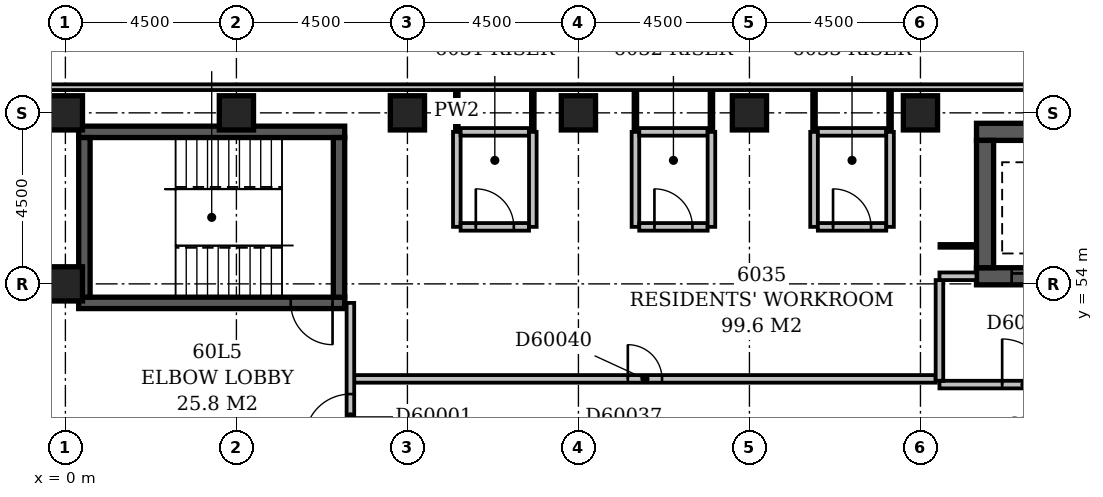
"""IFC4 building model, lengths in metres.
Left out: names, types, materials, properties, quantities, classifications, styles, units other than length and angle.
Written with IfcOpenShell. Run it as: python <this file> out.ifc"""

import sys

from ifc_helpers import new_model, si_unit, direction, frame, frame_2d, origin, origin_2d, place, context, subcontext, project, spatial, rectangle, extrude, element, fill, save


model = new_model("IFC4")
c1 = context("Model", 3, precision=1e-05, world=origin(), true_north=direction((0.0, 1.0)))
c2 = subcontext(c1, "Body", "Model", "MODEL_VIEW")
j1 = project(units=[si_unit("LENGTHUNIT", "METRE"), si_unit("PLANEANGLEUNIT", "RADIAN")], contexts=[c1])
p1 = place(None, origin())
s1 = spatial("IfcSite", under=j1, at=p1, CompositionType="ELEMENT")
p2 = place(p1, origin())
s2 = spatial("IfcBuilding", under=s1, at=p2, CompositionType="ELEMENT")
p3 = place(p2, frame((0.0, 0.0, 233.0)))
s3 = spatial("IfcBuildingStorey", under=s2, at=p3, CompositionType="ELEMENT", Elevation=233.0)
p4 = place(p3, frame((0.35, 53.5, -0.35), z_axis=(0.0, 0.0, 1.0), x_axis=(1.0, 0.0, 0.0)))
e1 = element("IfcWall", 1, at=p4, inside=s3, PredefinedType="SHEAR", context=c2, shape_type="SweptSolid", body=[
    extrude(rectangle(XDim=7.0, YDim=0.3, at=frame_2d((3.5, 0.0))), origin(), (0.0, 0.0, 1.0), 3.65),
])
p5 = place(p4, frame((5.58, 0.0, 0.35)))
e2 = element("IfcOpeningElement", 2, at=p5, cuts=e1, PredefinedType="OPENING", context=c2, shape_type="SweptSolid", body=[
    extrude(rectangle(XDim=1.1, YDim=2.1, at=frame_2d((0.55, 1.05))), frame((0.0, 0.162, 0.0), z_axis=(0.0, -1.0, 0.0), x_axis=(1.0, 0.0, 0.0)), (0.0, 0.0, 1.0), 0.324),
])
p6 = place(p3, frame((0.35, 58.0, -0.35), z_axis=(0.0, 0.0, 1.0), x_axis=(1.0, 0.0, 0.0)))
e3 = element("IfcWall", 3, at=p6, inside=s3, PredefinedType="SHEAR", context=c2, shape_type="SweptSolid", body=[
    extrude(rectangle(XDim=7.0, YDim=0.3, at=frame_2d((3.5, 0.0))), origin(), (0.0, 0.0, 1.0), 3.65),
])
for number, where, z_axis, x_axis in (
    (4, (0.5, 53.65, -0.35), (0.0, 0.0, 1.0), (0.0, 1.0, 0.0)),
    (5, (7.2, 53.65, -0.35), (0.0, 0.0, 1.0), (0.0, 1.0, 0.0)),
):
    element("IfcWall", number, at=place(p3, frame(where, z_axis=z_axis, x_axis=x_axis)), inside=s3, PredefinedType="SHEAR", context=c2, shape_type="SweptSolid", body=[
        extrude(rectangle(XDim=4.2, YDim=0.3, at=frame_2d((2.1, 0.0))), origin(), (0.0, 0.0, 1.0), 3.65),
    ])
p7 = place(p3, frame((23.975, 54.2, -0.35), z_axis=(0.0, 0.0, 1.0), x_axis=(1.0, 0.0, 0.0)))
e6 = element("IfcWall", 6, at=p7, inside=s3, PredefinedType="SHEAR", context=c2, shape_type="SweptSolid", body=[
    extrude(rectangle(XDim=2.95, YDim=0.45, at=frame_2d((1.475, 0.0))), origin(), (0.0, 0.0, 1.0), 3.65),
])
p8 = place(p7, frame((0.925, 0.0, 0.35)))
e7 = element("IfcOpeningElement", 7, at=p8, cuts=e6, PredefinedType="OPENING", context=c2, shape_type="SweptSolid", body=[
    extrude(rectangle(XDim=1.1, YDim=2.1, at=frame_2d((0.55, 1.05))), frame((0.0, 0.237, 0.0), z_axis=(0.0, -1.0, 0.0), x_axis=(1.0, 0.0, 0.0)), (0.0, 0.0, 1.0), 0.474),
])
p9 = place(p3, frame((23.975, 58.0, -0.35), z_axis=(0.0, 0.0, 1.0), x_axis=(1.0, 0.0, 0.0)))
e8 = element("IfcWall", 8, at=p9, inside=s3, PredefinedType="SHEAR", context=c2, shape_type="SweptSolid", body=[
    extrude(rectangle(XDim=2.95, YDim=0.45, at=frame_2d((1.475, 0.0))), origin(), (0.0, 0.0, 1.0), 3.65),
])
p10 = place(p3, frame((24.2, 54.425, -0.35), z_axis=(0.0, 0.0, 1.0), x_axis=(0.0, 1.0, 0.0)))
e9 = element("IfcWall", 9, at=p10, inside=s3, PredefinedType="SHEAR", context=c2, shape_type="SweptSolid", body=[
    extrude(rectangle(XDim=3.35, YDim=0.45, at=frame_2d((1.675, 0.0))), origin(), (0.0, 0.0, 1.0), 3.65),
])
for number, where, z_axis, x_axis in (
    (10, (0.0, 54.0, -0.35), (0.0, 0.0, 1.0), (1.0, 0.0, 0.0)),
    (11, (0.0, 58.5, -0.35), (0.0, 0.0, 1.0), (1.0, 0.0, 0.0)),
    (12, (4.5, 58.5, -0.35), (0.0, 0.0, 1.0), (1.0, 0.0, 0.0)),
    (13, (9.0, 58.5, -0.35), (0.0, 0.0, 1.0), (1.0, 0.0, 0.0)),
    (14, (13.5, 58.5, -0.35), (0.0, 0.0, 1.0), (1.0, 0.0, 0.0)),
    (15, (18.0, 58.5, -0.35), (0.0, 0.0, 1.0), (1.0, 0.0, 0.0)),
    (16, (22.5, 58.5, -0.35), (0.0, 0.0, 1.0), (1.0, 0.0, 0.0)),
):
    element("IfcColumn", number, at=place(p3, frame(where, z_axis=z_axis, x_axis=x_axis)), inside=s3, PredefinedType="COLUMN", context=c2, shape_type="SweptSolid", body=[
        extrude(rectangle(XDim=0.9, YDim=0.9, at=origin_2d()), origin(), (0.0, 0.0, 1.0), 3.65),
    ])
p11 = place(p3, frame((45.6, 59.175, 0.0), z_axis=(0.0, 0.0, 1.0), x_axis=(-1.0, 0.0, 0.0)))
e17 = element("IfcWall", 17, at=p11, inside=s3, PredefinedType="STANDARD", context=c2, shape_type="SweptSolid", body=[
    extrude(rectangle(XDim=46.35, YDim=0.15, at=frame_2d((23.175, 0.0))), origin(), (0.0, 0.0, 1.0), 2.7),
])
p12 = place(p11, frame((15.15, 0.0, 0.6)))
e18 = element("IfcOpeningElement", 18, at=p12, cuts=e17, PredefinedType="OPENING", context=c2, shape_type="SweptSolid", body=[
    extrude(rectangle(XDim=2.4, YDim=1.8, at=frame_2d((1.2, 0.9))), frame((0.0, 0.087, 0.0), z_axis=(0.0, -1.0, 0.0), x_axis=(1.0, 0.0, 0.0)), (0.0, 0.0, 1.0), 0.174),
])
p13 = place(p3, frame((23.0, 51.35, 0.0), z_axis=(0.0, 0.0, 1.0), x_axis=(1.0, 0.0, 0.0)))
e19 = element("IfcWall", 19, at=p13, inside=s3, PredefinedType="PARTITIONING", context=c2, shape_type="SweptSolid", body=[
    extrude(rectangle(XDim=4.8, YDim=0.2, at=frame_2d((2.4, 0.0))), origin(), (0.0, 0.0, 1.0), 3.3),
])
p14 = place(p13, frame((1.65, 0.0, 0.0)))
e20 = element("IfcOpeningElement", 20, at=p14, cuts=e19, PredefinedType="OPENING", context=c2, shape_type="SweptSolid", body=[
    extrude(rectangle(XDim=1.2, YDim=2.1, at=frame_2d((0.6, 1.05))), frame((0.0, 0.112, 0.0), z_axis=(0.0, -1.0, 0.0), x_axis=(1.0, 0.0, 0.0)), (0.0, 0.0, 1.0), 0.224),
])
p15 = place(p3, frame((23.0, 54.2, 0.0), z_axis=(0.0, 0.0, 1.0), x_axis=(1.0, 0.0, 0.0)))
e21 = element("IfcWall", 21, at=p15, inside=s3, PredefinedType="PARTITIONING", context=c2, shape_type="SweptSolid", body=[
    extrude(rectangle(XDim=0.975, YDim=0.2, at=frame_2d((0.488, 0.0))), origin(), (0.0, 0.0, 1.0), 3.3),
])
p16 = place(p3, frame((23.0, 51.45, 0.0), z_axis=(0.0, 0.0, 1.0), x_axis=(0.0, 1.0, 0.0)))
e22 = element("IfcWall", 22, at=p16, inside=s3, PredefinedType="PARTITIONING", context=c2, shape_type="SweptSolid", body=[
    extrude(rectangle(XDim=2.65, YDim=0.2, at=frame_2d((1.325, 0.0))), origin(), (0.0, 0.0, 1.0), 3.3),
])
p17 = place(p3, frame((7.5, 49.6, 0.0), z_axis=(0.0, 0.0, 1.0), x_axis=(0.0, 1.0, 0.0)))
e23 = element("IfcWall", 23, at=p17, inside=s3, PredefinedType="PARTITIONING", context=c2, shape_type="SweptSolid", body=[
    extrude(rectangle(XDim=3.9, YDim=0.2, at=frame_2d((1.95, 0.0))), origin(), (0.0, 0.0, 1.0), 3.3),
])
p18 = place(p17, frame((0.3, 0.0, 0.0)))
e24 = element("IfcOpeningElement", 24, at=p18, cuts=e23, PredefinedType="OPENING", context=c2, shape_type="SweptSolid", body=[
    extrude(rectangle(XDim=1.2, YDim=2.1, at=frame_2d((0.6, 1.05))), frame((0.0, 0.112, 0.0), z_axis=(0.0, -1.0, 0.0), x_axis=(1.0, 0.0, 0.0)), (0.0, 0.0, 1.0), 0.224),
])
p19 = place(p3, frame((7.6, 51.5, 0.0), z_axis=(0.0, 0.0, 1.0), x_axis=(1.0, 0.0, 0.0)))
e25 = element("IfcWall", 25, at=p19, inside=s3, PredefinedType="PARTITIONING", context=c2, shape_type="SweptSolid", body=[
    extrude(rectangle(XDim=15.3, YDim=0.2, at=frame_2d((7.65, 0.0))), origin(), (0.0, 0.0, 1.0), 3.3),
])
p20 = place(p19, frame((7.2, 0.0, 0.0)))
e26 = element("IfcOpeningElement", 26, at=p20, cuts=e25, PredefinedType="OPENING", context=c2, shape_type="SweptSolid", body=[
    extrude(rectangle(XDim=0.9, YDim=2.1, at=frame_2d((0.45, 1.05))), frame((0.0, 0.112, 0.0), z_axis=(0.0, -1.0, 0.0), x_axis=(1.0, 0.0, 0.0)), (0.0, 0.0, 1.0), 0.224),
])
p21 = place(p3, frame((23.0, 55.0, 0.0), z_axis=(0.0, 0.0, 1.0), x_axis=(1.0, 0.0, 0.0)))
e27 = element("IfcWall", 27, at=p21, inside=s3, PredefinedType="PARTITIONING", context=c2, shape_type="SweptSolid", body=[
    extrude(rectangle(XDim=0.975, YDim=0.1, at=frame_2d((0.488, 0.0))), origin(), (0.0, 0.0, 1.0), 3.3),
])
p22 = place(p3, frame((10.3, 55.5, 0.0), z_axis=(0.0, 0.0, 1.0), x_axis=(0.0, 1.0, 0.0)))
e28 = element("IfcWall", 28, at=p22, inside=s3, PredefinedType="PARTITIONING", context=c2, shape_type="SweptSolid", body=[
    extrude(rectangle(XDim=2.5, YDim=0.2, at=frame_2d((1.25, 0.0))), origin(), (0.0, 0.0, 1.0), 3.3),
])
p23 = place(p3, frame((10.4, 55.5, 0.0), z_axis=(0.0, 0.0, 1.0), x_axis=(1.0, 0.0, 0.0)))
e29 = element("IfcWall", 29, at=p23, inside=s3, PredefinedType="PARTITIONING", context=c2, shape_type="SweptSolid", body=[
    extrude(rectangle(XDim=1.8, YDim=0.2, at=frame_2d((0.9, 0.0))), origin(), (0.0, 0.0, 1.0), 3.3),
])
p24 = place(p23, frame((0.4, 0.0, 0.0)))
e30 = element("IfcOpeningElement", 30, at=p24, cuts=e29, PredefinedType="OPENING", context=c2, shape_type="SweptSolid", body=[
    extrude(rectangle(XDim=1.0, YDim=2.1, at=frame_2d((0.5, 1.05))), frame((0.0, 0.112, 0.0), z_axis=(0.0, -1.0, 0.0), x_axis=(1.0, 0.0, 0.0)), (0.0, 0.0, 1.0), 0.224),
])
for number, where, z_axis, x_axis in (
    (31, (12.3, 55.5, 0.0), (0.0, 0.0, 1.0), (0.0, 1.0, 0.0)),
    (32, (15.0, 55.5, 0.0), (0.0, 0.0, 1.0), (0.0, 1.0, 0.0)),
):
    element("IfcWall", number, at=place(p3, frame(where, z_axis=z_axis, x_axis=x_axis)), inside=s3, PredefinedType="PARTITIONING", context=c2, shape_type="SweptSolid", body=[
        extrude(rectangle(XDim=2.5, YDim=0.2, at=frame_2d((1.25, 0.0))), origin(), (0.0, 0.0, 1.0), 3.3),
    ])
p25 = place(p3, frame((15.1, 55.5, 0.0), z_axis=(0.0, 0.0, 1.0), x_axis=(1.0, 0.0, 0.0)))
e33 = element("IfcWall", 33, at=p25, inside=s3, PredefinedType="PARTITIONING", context=c2, shape_type="SweptSolid", body=[
    extrude(rectangle(XDim=1.8, YDim=0.2, at=frame_2d((0.9, 0.0))), origin(), (0.0, 0.0, 1.0), 3.3),
])
p26 = place(p25, frame((0.4, 0.0, 0.0)))
e34 = element("IfcOpeningElement", 34, at=p26, cuts=e33, PredefinedType="OPENING", context=c2, shape_type="SweptSolid", body=[
    extrude(rectangle(XDim=1.0, YDim=2.1, at=frame_2d((0.5, 1.05))), frame((0.0, 0.112, 0.0), z_axis=(0.0, -1.0, 0.0), x_axis=(1.0, 0.0, 0.0)), (0.0, 0.0, 1.0), 0.224),
])
for number, where, z_axis, x_axis in (
    (35, (17.0, 55.5, 0.0), (0.0, 0.0, 1.0), (0.0, 1.0, 0.0)),
    (36, (19.7, 55.5, 0.0), (0.0, 0.0, 1.0), (0.0, 1.0, 0.0)),
):
    element("IfcWall", number, at=place(p3, frame(where, z_axis=z_axis, x_axis=x_axis)), inside=s3, PredefinedType="PARTITIONING", context=c2, shape_type="SweptSolid", body=[
        extrude(rectangle(XDim=2.5, YDim=0.2, at=frame_2d((1.25, 0.0))), origin(), (0.0, 0.0, 1.0), 3.3),
    ])
p27 = place(p3, frame((19.8, 55.5, 0.0), z_axis=(0.0, 0.0, 1.0), x_axis=(1.0, 0.0, 0.0)))
e37 = element("IfcWall", 37, at=p27, inside=s3, PredefinedType="PARTITIONING", context=c2, shape_type="SweptSolid", body=[
    extrude(rectangle(XDim=1.8, YDim=0.2, at=frame_2d((0.9, 0.0))), origin(), (0.0, 0.0, 1.0), 3.3),
])
p28 = place(p27, frame((0.4, 0.0, 0.0)))
e38 = element("IfcOpeningElement", 38, at=p28, cuts=e37, PredefinedType="OPENING", context=c2, shape_type="SweptSolid", body=[
    extrude(rectangle(XDim=1.0, YDim=2.1, at=frame_2d((0.5, 1.05))), frame((0.0, 0.112, 0.0), z_axis=(0.0, -1.0, 0.0), x_axis=(1.0, 0.0, 0.0)), (0.0, 0.0, 1.0), 0.224),
])
p29 = place(p3, frame((21.7, 55.5, 0.0), z_axis=(0.0, 0.0, 1.0), x_axis=(0.0, 1.0, 0.0)))
e39 = element("IfcWall", 39, at=p29, inside=s3, PredefinedType="PARTITIONING", context=c2, shape_type="SweptSolid", body=[
    extrude(rectangle(XDim=2.5, YDim=0.2, at=frame_2d((1.25, 0.0))), origin(), (0.0, 0.0, 1.0), 3.3),
])
p30 = place(p3, frame((10.3, 58.0, 0.0), z_axis=(0.0, 0.0, 1.0), x_axis=(0.0, 1.0, 0.0)))
e40 = element("IfcWall", 40, at=p30, inside=s3, PredefinedType="PARTITIONING", context=c2, shape_type="SweptSolid", body=[
    extrude(rectangle(XDim=1.1, YDim=0.1, at=frame_2d((0.55, 0.0))), origin(), (0.0, 0.0, 1.0), 3.3),
])
p31 = place(p3, frame((10.4, 58.0, 0.0), z_axis=(0.0, 0.0, 1.0), x_axis=(1.0, 0.0, 0.0)))
e41 = element("IfcWall", 41, at=p31, inside=s3, PredefinedType="PARTITIONING", context=c2, shape_type="SweptSolid", body=[
    extrude(rectangle(XDim=1.8, YDim=0.2, at=frame_2d((0.9, 0.0))), origin(), (0.0, 0.0, 1.0), 3.3),
])
for number, where, z_axis, x_axis in (
    (42, (12.3, 58.0, 0.0), (0.0, 0.0, 1.0), (0.0, 1.0, 0.0)),
    (43, (15.0, 58.0, 0.0), (0.0, 0.0, 1.0), (0.0, 1.0, 0.0)),
):
    element("IfcWall", number, at=place(p3, frame(where, z_axis=z_axis, x_axis=x_axis)), inside=s3, PredefinedType="PARTITIONING", context=c2, shape_type="SweptSolid", body=[
        extrude(rectangle(XDim=1.1, YDim=0.1, at=frame_2d((0.55, 0.0))), origin(), (0.0, 0.0, 1.0), 3.3),
    ])
p32 = place(p3, frame((15.1, 58.0, 0.0), z_axis=(0.0, 0.0, 1.0), x_axis=(1.0, 0.0, 0.0)))
e44 = element("IfcWall", 44, at=p32, inside=s3, PredefinedType="PARTITIONING", context=c2, shape_type="SweptSolid", body=[
    extrude(rectangle(XDim=1.8, YDim=0.2, at=frame_2d((0.9, 0.0))), origin(), (0.0, 0.0, 1.0), 3.3),
])
for number, where, z_axis, x_axis in (
    (45, (17.0, 58.0, 0.0), (0.0, 0.0, 1.0), (0.0, 1.0, 0.0)),
    (46, (19.7, 58.0, 0.0), (0.0, 0.0, 1.0), (0.0, 1.0, 0.0)),
):
    element("IfcWall", number, at=place(p3, frame(where, z_axis=z_axis, x_axis=x_axis)), inside=s3, PredefinedType="PARTITIONING", context=c2, shape_type="SweptSolid", body=[
        extrude(rectangle(XDim=1.1, YDim=0.1, at=frame_2d((0.55, 0.0))), origin(), (0.0, 0.0, 1.0), 3.3),
    ])
p33 = place(p3, frame((19.8, 58.0, 0.0), z_axis=(0.0, 0.0, 1.0), x_axis=(1.0, 0.0, 0.0)))
e47 = element("IfcWall", 47, at=p33, inside=s3, PredefinedType="PARTITIONING", context=c2, shape_type="SweptSolid", body=[
    extrude(rectangle(XDim=1.8, YDim=0.2, at=frame_2d((0.9, 0.0))), origin(), (0.0, 0.0, 1.0), 3.3),
])
p34 = place(p3, frame((21.7, 58.0, 0.0), z_axis=(0.0, 0.0, 1.0), x_axis=(0.0, 1.0, 0.0)))
e48 = element("IfcWall", 48, at=p34, inside=s3, PredefinedType="PARTITIONING", context=c2, shape_type="SweptSolid", body=[
    extrude(rectangle(XDim=1.1, YDim=0.1, at=frame_2d((0.55, 0.0))), origin(), (0.0, 0.0, 1.0), 3.3),
])
p35 = place(p18, origin())
e49 = element("IfcDoor", 49, at=p35, inside=s3, OperationType="SINGLE_SWING_LEFT", PredefinedType="DOOR", context=c2, shape_type="SweptSolid", body=[
    extrude(rectangle(XDim=1.2, YDim=2.1, at=frame_2d((0.6, 1.05))), frame((0.0, 0.025, 0.0), z_axis=(0.0, -1.0, 0.0), x_axis=(1.0, 0.0, 0.0)), (0.0, 0.0, 1.0), 0.05),
])
fill(e24, e49)
p36 = place(p14, origin())
e50 = element("IfcDoor", 50, at=p36, inside=s3, OperationType="SINGLE_SWING_LEFT", PredefinedType="DOOR", context=c2, shape_type="SweptSolid", body=[
    extrude(rectangle(XDim=1.2, YDim=2.1, at=frame_2d((0.6, 1.05))), frame((0.0, 0.025, 0.0), z_axis=(0.0, -1.0, 0.0), x_axis=(1.0, 0.0, 0.0)), (0.0, 0.0, 1.0), 0.05),
])
fill(e20, e50)
p37 = place(p8, origin())
e51 = element("IfcDoor", 51, at=p37, inside=s3, OperationType="SLIDING_TO_LEFT", PredefinedType="DOOR", context=c2, shape_type="SweptSolid", body=[
    extrude(rectangle(XDim=1.1, YDim=2.1, at=frame_2d((0.55, 1.05))), frame((0.0, 0.025, 0.0), z_axis=(0.0, -1.0, 0.0), x_axis=(1.0, 0.0, 0.0)), (0.0, 0.0, 1.0), 0.05),
])
fill(e7, e51)
p38 = place(p5, origin())
e52 = element("IfcDoor", 52, at=p38, inside=s3, OperationType="SINGLE_SWING_RIGHT", PredefinedType="DOOR", context=c2, shape_type="SweptSolid", body=[
    extrude(rectangle(XDim=1.1, YDim=2.1, at=frame_2d((0.55, 1.05))), frame((0.0, 0.025, 0.0), z_axis=(0.0, -1.0, 0.0), x_axis=(1.0, 0.0, 0.0)), (0.0, 0.0, 1.0), 0.05),
])
fill(e2, e52)
p39 = place(p20, origin())
e53 = element("IfcDoor", 53, at=p39, inside=s3, OperationType="SINGLE_SWING_LEFT", PredefinedType="DOOR", context=c2, shape_type="SweptSolid", body=[
    extrude(rectangle(XDim=0.9, YDim=2.1, at=frame_2d((0.45, 1.05))), frame((0.0, 0.025, 0.0), z_axis=(0.0, -1.0, 0.0), x_axis=(1.0, 0.0, 0.0)), (0.0, 0.0, 1.0), 0.05),
])
fill(e26, e53)
p40 = place(p24, origin())
e54 = element("IfcDoor", 54, at=p40, inside=s3, OperationType="SINGLE_SWING_LEFT", PredefinedType="DOOR", context=c2, shape_type="SweptSolid", body=[
    extrude(rectangle(XDim=1.0, YDim=2.1, at=frame_2d((0.5, 1.05))), frame((0.0, 0.025, 0.0), z_axis=(0.0, -1.0, 0.0), x_axis=(1.0, 0.0, 0.0)), (0.0, 0.0, 1.0), 0.05),
])
fill(e30, e54)
p41 = place(p26, origin())
e55 = element("IfcDoor", 55, at=p41, inside=s3, OperationType="SINGLE_SWING_LEFT", PredefinedType="DOOR", context=c2, shape_type="SweptSolid", body=[
    extrude(rectangle(XDim=1.0, YDim=2.1, at=frame_2d((0.5, 1.05))), frame((0.0, 0.025, 0.0), z_axis=(0.0, -1.0, 0.0), x_axis=(1.0, 0.0, 0.0)), (0.0, 0.0, 1.0), 0.05),
])
fill(e34, e55)
p42 = place(p28, origin())
e56 = element("IfcDoor", 56, at=p42, inside=s3, OperationType="SINGLE_SWING_LEFT", PredefinedType="DOOR", context=c2, shape_type="SweptSolid", body=[
    extrude(rectangle(XDim=1.0, YDim=2.1, at=frame_2d((0.5, 1.05))), frame((0.0, 0.025, 0.0), z_axis=(0.0, -1.0, 0.0), x_axis=(1.0, 0.0, 0.0)), (0.0, 0.0, 1.0), 0.05),
])
fill(e38, e56)
save(model, sys.argv[1])
